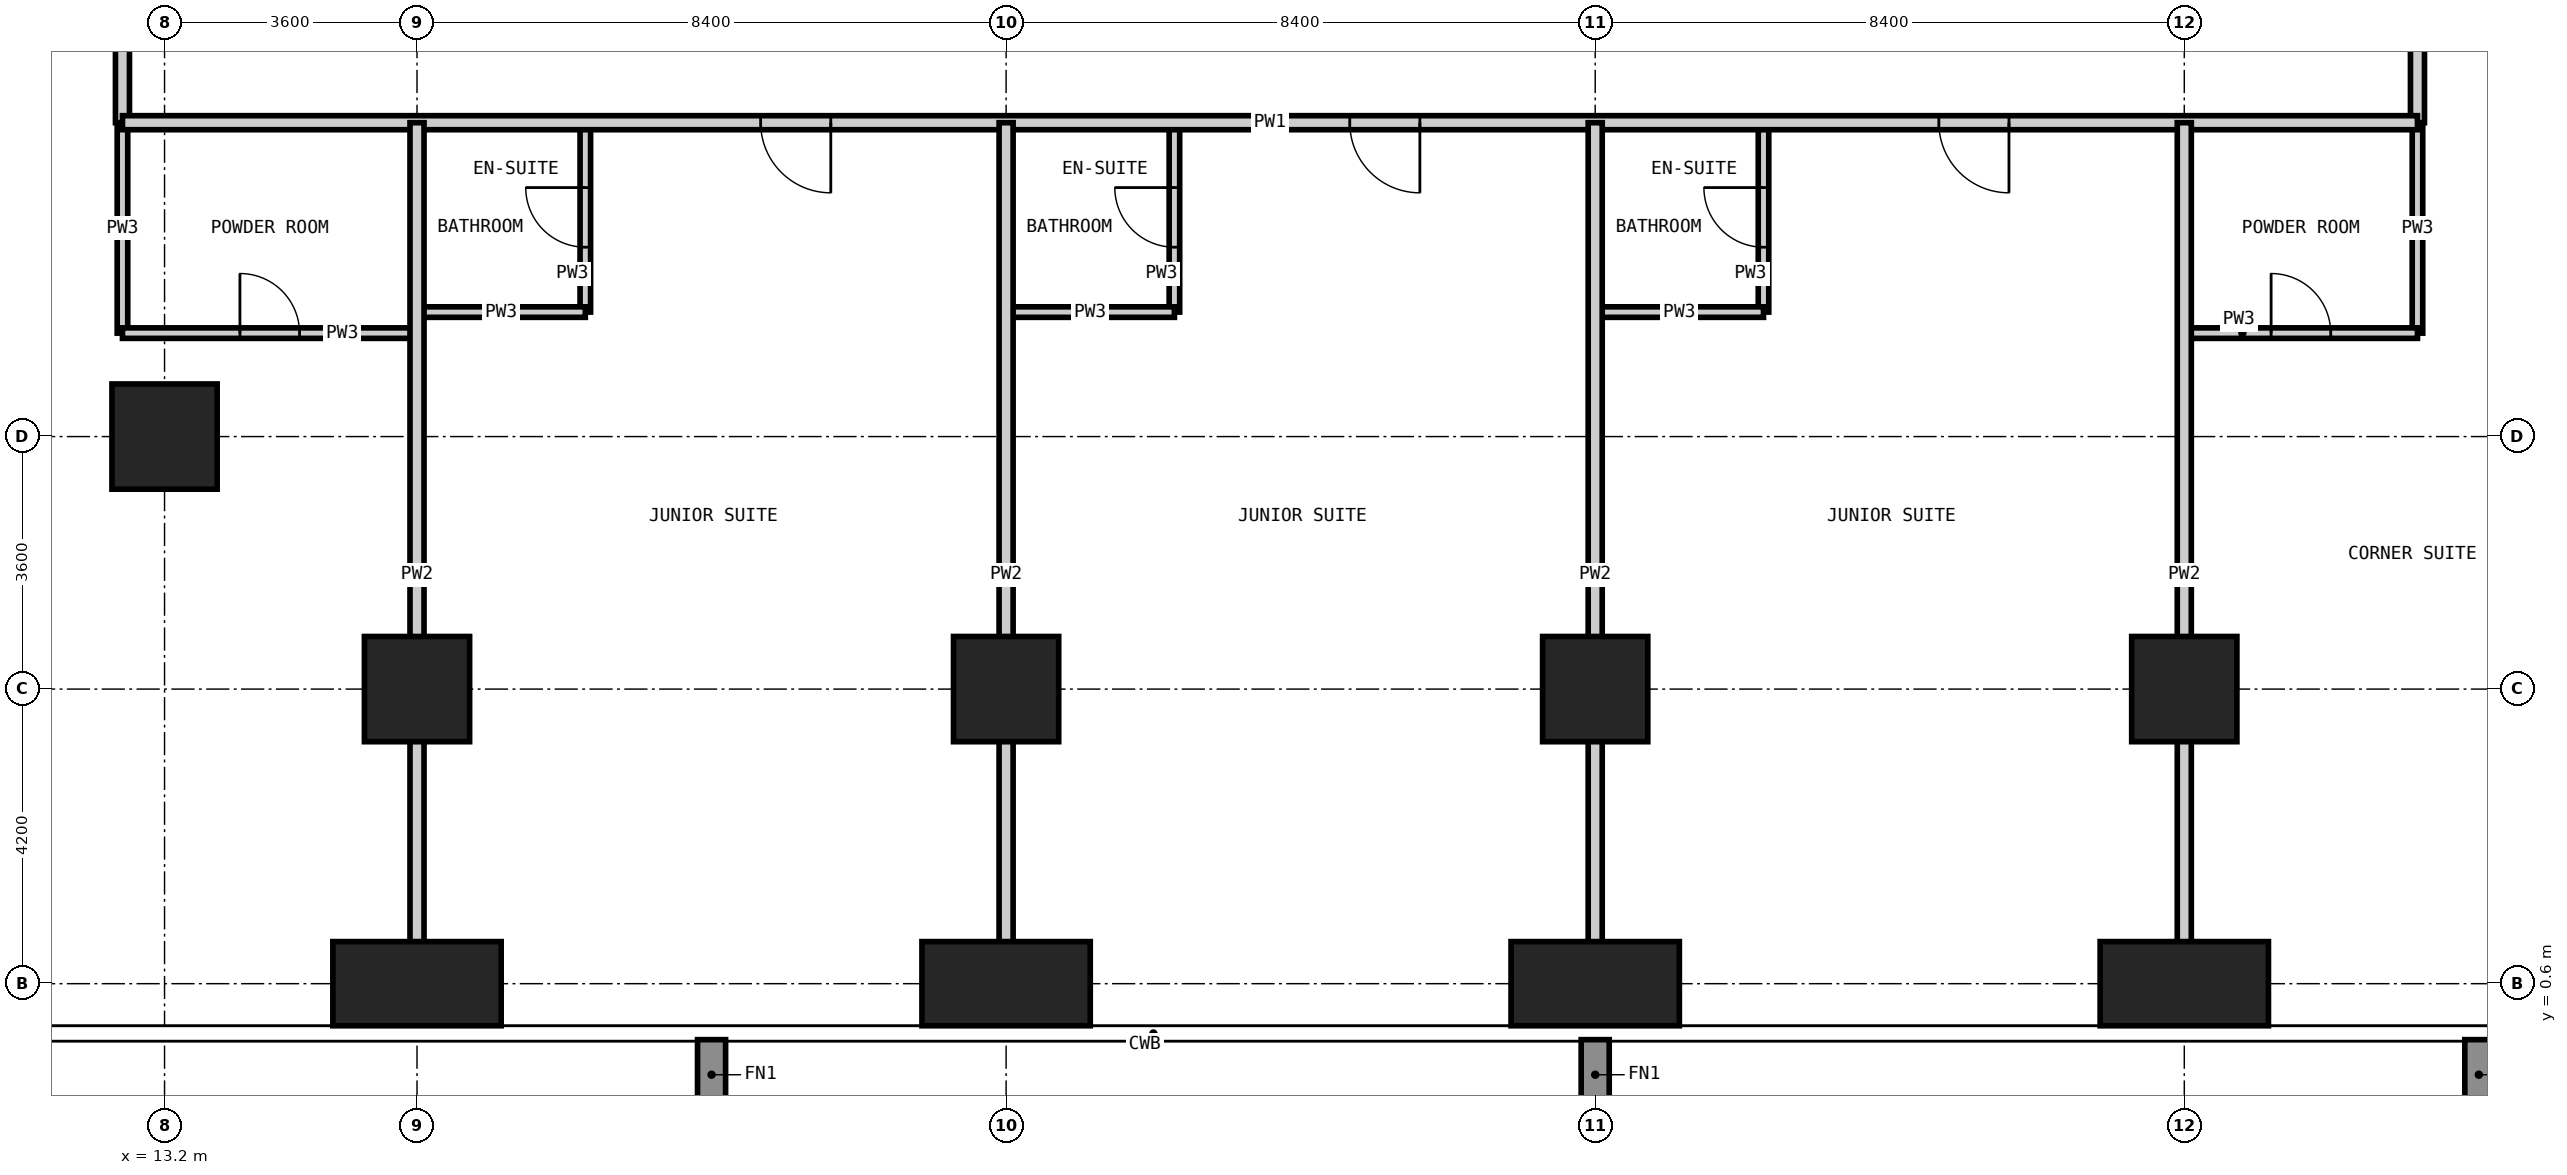
"""IFC4 building model, lengths in metres.
Left out: names, types, materials, properties, quantities, classifications, styles, units other than length and angle.
Written with IfcOpenShell. Run it as: python <this file> out.ifc"""

import sys

from ifc_helpers import new_model, si_unit, direction, frame, frame_2d, origin, origin_2d, place, context, subcontext, project, spatial, rectangle, extrude, element, fill, save


model = new_model("IFC4")
c1 = context("Model", 3, precision=1e-05, world=origin(), true_north=direction((0.0, 1.0)))
c2 = subcontext(c1, "Body", "Model", "MODEL_VIEW")
j1 = project(units=[si_unit("LENGTHUNIT", "METRE"), si_unit("PLANEANGLEUNIT", "RADIAN")], contexts=[c1])
p1 = place(None, origin())
s1 = spatial("IfcSite", under=j1, at=p1, CompositionType="ELEMENT")
p2 = place(p1, origin())
s2 = spatial("IfcBuilding", under=s1, at=p2, CompositionType="ELEMENT")
p3 = place(p2, frame((0.0, 0.0, 111.6)))
s3 = spatial("IfcBuildingStorey", under=s2, at=p3, CompositionType="ELEMENT", Elevation=111.6)
p4 = place(p3, frame((13.2, 8.4, -0.35), z_axis=(0.0, 0.0, 1.0), x_axis=(1.0, 0.0, 0.0)))
e1 = element("IfcColumn", 1, at=p4, inside=s3, PredefinedType="COLUMN", context=c2, shape_type="SweptSolid", body=[
    extrude(rectangle(XDim=1.5, YDim=1.5, at=origin_2d()), origin(), (0.0, 0.0, 1.0), 3.6),
])
p5 = place(p3, frame((16.8, 0.6, -0.35), z_axis=(0.0, 0.0, 1.0), x_axis=(1.0, 0.0, 0.0)))
e2 = element("IfcColumn", 2, at=p5, inside=s3, PredefinedType="COLUMN", context=c2, shape_type="SweptSolid", body=[
    extrude(rectangle(XDim=2.4, YDim=1.2, at=origin_2d()), origin(), (0.0, 0.0, 1.0), 3.6),
])
p6 = place(p3, frame((16.8, 4.8, -0.35), z_axis=(0.0, 0.0, 1.0), x_axis=(1.0, 0.0, 0.0)))
e3 = element("IfcColumn", 3, at=p6, inside=s3, PredefinedType="COLUMN", context=c2, shape_type="SweptSolid", body=[
    extrude(rectangle(XDim=1.5, YDim=1.5, at=origin_2d()), origin(), (0.0, 0.0, 1.0), 3.6),
])
p7 = place(p3, frame((25.2, 0.6, -0.35), z_axis=(0.0, 0.0, 1.0), x_axis=(1.0, 0.0, 0.0)))
e4 = element("IfcColumn", 4, at=p7, inside=s3, PredefinedType="COLUMN", context=c2, shape_type="SweptSolid", body=[
    extrude(rectangle(XDim=2.4, YDim=1.2, at=origin_2d()), origin(), (0.0, 0.0, 1.0), 3.6),
])
p8 = place(p3, frame((25.2, 4.8, -0.35), z_axis=(0.0, 0.0, 1.0), x_axis=(1.0, 0.0, 0.0)))
e5 = element("IfcColumn", 5, at=p8, inside=s3, PredefinedType="COLUMN", context=c2, shape_type="SweptSolid", body=[
    extrude(rectangle(XDim=1.5, YDim=1.5, at=origin_2d()), origin(), (0.0, 0.0, 1.0), 3.6),
])
p9 = place(p3, frame((33.6, 0.6, -0.35), z_axis=(0.0, 0.0, 1.0), x_axis=(1.0, 0.0, 0.0)))
e6 = element("IfcColumn", 6, at=p9, inside=s3, PredefinedType="COLUMN", context=c2, shape_type="SweptSolid", body=[
    extrude(rectangle(XDim=2.4, YDim=1.2, at=origin_2d()), origin(), (0.0, 0.0, 1.0), 3.6),
])
p10 = place(p3, frame((33.6, 4.8, -0.35), z_axis=(0.0, 0.0, 1.0), x_axis=(1.0, 0.0, 0.0)))
e7 = element("IfcColumn", 7, at=p10, inside=s3, PredefinedType="COLUMN", context=c2, shape_type="SweptSolid", body=[
    extrude(rectangle(XDim=1.5, YDim=1.5, at=origin_2d()), origin(), (0.0, 0.0, 1.0), 3.6),
])
p11 = place(p3, frame((42.0, 0.6, -0.35), z_axis=(0.0, 0.0, 1.0), x_axis=(1.0, 0.0, 0.0)))
e8 = element("IfcColumn", 8, at=p11, inside=s3, PredefinedType="COLUMN", context=c2, shape_type="SweptSolid", body=[
    extrude(rectangle(XDim=2.4, YDim=1.2, at=origin_2d()), origin(), (0.0, 0.0, 1.0), 3.6),
])
p12 = place(p3, frame((42.0, 4.8, -0.35), z_axis=(0.0, 0.0, 1.0), x_axis=(1.0, 0.0, 0.0)))
e9 = element("IfcColumn", 9, at=p12, inside=s3, PredefinedType="COLUMN", context=c2, shape_type="SweptSolid", body=[
    extrude(rectangle(XDim=1.5, YDim=1.5, at=origin_2d()), origin(), (0.0, 0.0, 1.0), 3.6),
])
p13 = place(p3, frame((12.6, 9.875, 0.0), z_axis=(0.0, 0.0, 1.0), x_axis=(0.0, 1.0, 0.0)))
e10 = element("IfcWall", 10, at=p13, inside=s3, PredefinedType="PARTITIONING", context=c2, shape_type="SweptSolid", body=[
    extrude(rectangle(XDim=3.0, YDim=0.15, at=frame_2d((1.5, 0.0))), origin(), (0.0, 0.0, 1.0), 3.25),
])
p14 = place(p3, frame((19.2, 10.175, 0.0), z_axis=(0.0, 0.0, 1.0), x_axis=(0.0, 1.0, 0.0)))
e11 = element("IfcWall", 11, at=p14, inside=s3, PredefinedType="PARTITIONING", context=c2, shape_type="SweptSolid", body=[
    extrude(rectangle(XDim=2.7, YDim=0.15, at=frame_2d((1.35, 0.0))), origin(), (0.0, 0.0, 1.0), 3.25),
])
p15 = place(p14, frame((0.925, 0.0, 0.0)))
e12 = element("IfcOpeningElement", 12, at=p15, cuts=e11, PredefinedType="OPENING", context=c2, shape_type="SweptSolid", body=[
    extrude(rectangle(XDim=0.85, YDim=2.1, at=frame_2d((0.425, 1.05))), frame((0.0, 0.085, 0.0), z_axis=(0.0, -1.0, 0.0), x_axis=(1.0, 0.0, 0.0)), (0.0, 0.0, 1.0), 0.17),
])
p16 = place(p3, frame((27.6, 10.175, 0.0), z_axis=(0.0, 0.0, 1.0), x_axis=(0.0, 1.0, 0.0)))
e13 = element("IfcWall", 13, at=p16, inside=s3, PredefinedType="PARTITIONING", context=c2, shape_type="SweptSolid", body=[
    extrude(rectangle(XDim=2.7, YDim=0.15, at=frame_2d((1.35, 0.0))), origin(), (0.0, 0.0, 1.0), 3.25),
])
p17 = place(p16, frame((0.925, 0.0, 0.0)))
e14 = element("IfcOpeningElement", 14, at=p17, cuts=e13, PredefinedType="OPENING", context=c2, shape_type="SweptSolid", body=[
    extrude(rectangle(XDim=0.85, YDim=2.1, at=frame_2d((0.425, 1.05))), frame((0.0, 0.085, 0.0), z_axis=(0.0, -1.0, 0.0), x_axis=(1.0, 0.0, 0.0)), (0.0, 0.0, 1.0), 0.17),
])
p18 = place(p3, frame((36.0, 10.175, 0.0), z_axis=(0.0, 0.0, 1.0), x_axis=(0.0, 1.0, 0.0)))
e15 = element("IfcWall", 15, at=p18, inside=s3, PredefinedType="PARTITIONING", context=c2, shape_type="SweptSolid", body=[
    extrude(rectangle(XDim=2.7, YDim=0.15, at=frame_2d((1.35, 0.0))), origin(), (0.0, 0.0, 1.0), 3.25),
])
p19 = place(p18, frame((0.925, 0.0, 0.0)))
e16 = element("IfcOpeningElement", 16, at=p19, cuts=e15, PredefinedType="OPENING", context=c2, shape_type="SweptSolid", body=[
    extrude(rectangle(XDim=0.85, YDim=2.1, at=frame_2d((0.425, 1.05))), frame((0.0, 0.085, 0.0), z_axis=(0.0, -1.0, 0.0), x_axis=(1.0, 0.0, 0.0)), (0.0, 0.0, 1.0), 0.17),
])
p20 = place(p3, frame((45.325, 9.875, 0.0), z_axis=(0.0, 0.0, 1.0), x_axis=(0.0, 1.0, 0.0)))
e17 = element("IfcWall", 17, at=p20, inside=s3, PredefinedType="PARTITIONING", context=c2, shape_type="SweptSolid", body=[
    extrude(rectangle(XDim=3.0, YDim=0.15, at=frame_2d((1.5, 0.0))), origin(), (0.0, 0.0, 1.0), 3.25),
])
p21 = place(p3, frame((12.6, 9.875, 0.0), z_axis=(0.0, 0.0, 1.0), x_axis=(1.0, 0.0, 0.0)))
e18 = element("IfcWall", 18, at=p21, inside=s3, PredefinedType="PARTITIONING", context=c2, shape_type="SweptSolid", body=[
    extrude(rectangle(XDim=4.2, YDim=0.15, at=frame_2d((2.1, 0.0))), origin(), (0.0, 0.0, 1.0), 3.25),
])
p22 = place(p21, frame((1.675, 0.0, 0.0)))
e19 = element("IfcOpeningElement", 19, at=p22, cuts=e18, PredefinedType="OPENING", context=c2, shape_type="SweptSolid", body=[
    extrude(rectangle(XDim=0.85, YDim=2.1, at=frame_2d((0.425, 1.05))), frame((0.0, 0.085, 0.0), z_axis=(0.0, -1.0, 0.0), x_axis=(1.0, 0.0, 0.0)), (0.0, 0.0, 1.0), 0.17),
])
p23 = place(p3, frame((42.0, 9.875, 0.0), z_axis=(0.0, 0.0, 1.0), x_axis=(1.0, 0.0, 0.0)))
e20 = element("IfcWall", 20, at=p23, inside=s3, PredefinedType="PARTITIONING", context=c2, shape_type="SweptSolid", body=[
    extrude(rectangle(XDim=3.325, YDim=0.15, at=frame_2d((1.663, 0.0))), origin(), (0.0, 0.0, 1.0), 3.25),
])
p24 = place(p23, frame((1.238, 0.0, 0.0)))
e21 = element("IfcOpeningElement", 21, at=p24, cuts=e20, PredefinedType="OPENING", context=c2, shape_type="SweptSolid", body=[
    extrude(rectangle(XDim=0.85, YDim=2.1, at=frame_2d((0.425, 1.05))), frame((0.0, 0.085, 0.0), z_axis=(0.0, -1.0, 0.0), x_axis=(1.0, 0.0, 0.0)), (0.0, 0.0, 1.0), 0.17),
])
p25 = place(p3, frame((16.8, 10.175, 0.0), z_axis=(0.0, 0.0, 1.0), x_axis=(1.0, 0.0, 0.0)))
e22 = element("IfcWall", 22, at=p25, inside=s3, PredefinedType="PARTITIONING", context=c2, shape_type="SweptSolid", body=[
    extrude(rectangle(XDim=2.4, YDim=0.15, at=frame_2d((1.2, 0.0))), origin(), (0.0, 0.0, 1.0), 3.25),
])
p26 = place(p3, frame((25.2, 10.175, 0.0), z_axis=(0.0, 0.0, 1.0), x_axis=(1.0, 0.0, 0.0)))
e23 = element("IfcWall", 23, at=p26, inside=s3, PredefinedType="PARTITIONING", context=c2, shape_type="SweptSolid", body=[
    extrude(rectangle(XDim=2.4, YDim=0.15, at=frame_2d((1.2, 0.0))), origin(), (0.0, 0.0, 1.0), 3.25),
])
p27 = place(p3, frame((33.6, 10.175, 0.0), z_axis=(0.0, 0.0, 1.0), x_axis=(1.0, 0.0, 0.0)))
e24 = element("IfcWall", 24, at=p27, inside=s3, PredefinedType="PARTITIONING", context=c2, shape_type="SweptSolid", body=[
    extrude(rectangle(XDim=2.4, YDim=0.15, at=frame_2d((1.2, 0.0))), origin(), (0.0, 0.0, 1.0), 3.25),
])
p28 = place(p3, frame((12.6, 12.875, 0.0), z_axis=(0.0, 0.0, 1.0), x_axis=(0.0, 1.0, 0.0)))
e25 = element("IfcWall", 25, at=p28, inside=s3, PredefinedType="PARTITIONING", context=c2, shape_type="SweptSolid", body=[
    extrude(rectangle(XDim=31.85, YDim=0.2, at=frame_2d((15.925, 0.0))), origin(), (0.0, 0.0, 1.0), 3.25),
])
p29 = place(p28, frame((8.825, 0.0, 0.0)))
e26 = element("IfcOpeningElement", 26, at=p29, cuts=e25, PredefinedType="OPENING", context=c2, shape_type="SweptSolid", body=[
    extrude(rectangle(XDim=1.0, YDim=2.2, at=frame_2d((0.5, 1.1))), frame((0.0, 0.11, 0.0), z_axis=(0.0, -1.0, 0.0), x_axis=(1.0, 0.0, 0.0)), (0.0, 0.0, 1.0), 0.22),
])
p30 = place(p28, frame((17.225, 0.0, 0.0)))
e27 = element("IfcOpeningElement", 27, at=p30, cuts=e25, PredefinedType="OPENING", context=c2, shape_type="SweptSolid", body=[
    extrude(rectangle(XDim=1.0, YDim=2.2, at=frame_2d((0.5, 1.1))), frame((0.0, 0.11, 0.0), z_axis=(0.0, -1.0, 0.0), x_axis=(1.0, 0.0, 0.0)), (0.0, 0.0, 1.0), 0.22),
])
p31 = place(p28, frame((25.625, 0.0, 0.0)))
e28 = element("IfcOpeningElement", 28, at=p31, cuts=e25, PredefinedType="OPENING", context=c2, shape_type="SweptSolid", body=[
    extrude(rectangle(XDim=1.0, YDim=2.2, at=frame_2d((0.5, 1.1))), frame((0.0, 0.11, 0.0), z_axis=(0.0, -1.0, 0.0), x_axis=(1.0, 0.0, 0.0)), (0.0, 0.0, 1.0), 0.22),
])
p32 = place(p28, frame((1.463, 0.0, 0.0)))
e29 = element("IfcOpeningElement", 29, at=p32, cuts=e25, PredefinedType="OPENING", context=c2, shape_type="SweptSolid", body=[
    extrude(rectangle(XDim=1.0, YDim=2.2, at=frame_2d((0.5, 1.1))), frame((0.0, 0.11, 0.0), z_axis=(0.0, -1.0, 0.0), x_axis=(1.0, 0.0, 0.0)), (0.0, 0.0, 1.0), 0.22),
])
p33 = place(p28, frame((29.987, 0.0, 0.0)))
e30 = element("IfcOpeningElement", 30, at=p33, cuts=e25, PredefinedType="OPENING", context=c2, shape_type="SweptSolid", body=[
    extrude(rectangle(XDim=1.0, YDim=2.2, at=frame_2d((0.5, 1.1))), frame((0.0, 0.11, 0.0), z_axis=(0.0, -1.0, 0.0), x_axis=(1.0, 0.0, 0.0)), (0.0, 0.0, 1.0), 0.22),
])
p34 = place(p3, frame((45.325, 44.725, 0.0), z_axis=(0.0, 0.0, 1.0), x_axis=(0.0, -1.0, 0.0)))
e31 = element("IfcWall", 31, at=p34, inside=s3, PredefinedType="PARTITIONING", context=c2, shape_type="SweptSolid", body=[
    extrude(rectangle(XDim=31.85, YDim=0.2, at=frame_2d((15.925, 0.0))), origin(), (0.0, 0.0, 1.0), 3.25),
])
p35 = place(p34, frame((24.425, 0.0, 0.0)))
e32 = element("IfcOpeningElement", 32, at=p35, cuts=e31, PredefinedType="OPENING", context=c2, shape_type="SweptSolid", body=[
    extrude(rectangle(XDim=1.0, YDim=2.2, at=frame_2d((0.5, 1.1))), frame((0.0, 0.11, 0.0), z_axis=(0.0, -1.0, 0.0), x_axis=(1.0, 0.0, 0.0)), (0.0, 0.0, 1.0), 0.22),
])
p36 = place(p34, frame((16.025, 0.0, 0.0)))
e33 = element("IfcOpeningElement", 33, at=p36, cuts=e31, PredefinedType="OPENING", context=c2, shape_type="SweptSolid", body=[
    extrude(rectangle(XDim=1.0, YDim=2.2, at=frame_2d((0.5, 1.1))), frame((0.0, 0.11, 0.0), z_axis=(0.0, -1.0, 0.0), x_axis=(1.0, 0.0, 0.0)), (0.0, 0.0, 1.0), 0.22),
])
p37 = place(p34, frame((7.625, 0.0, 0.0)))
e34 = element("IfcOpeningElement", 34, at=p37, cuts=e31, PredefinedType="OPENING", context=c2, shape_type="SweptSolid", body=[
    extrude(rectangle(XDim=1.0, YDim=2.2, at=frame_2d((0.5, 1.1))), frame((0.0, 0.11, 0.0), z_axis=(0.0, -1.0, 0.0), x_axis=(1.0, 0.0, 0.0)), (0.0, 0.0, 1.0), 0.22),
])
p38 = place(p34, frame((29.387, 0.0, 0.0)))
e35 = element("IfcOpeningElement", 35, at=p38, cuts=e31, PredefinedType="OPENING", context=c2, shape_type="SweptSolid", body=[
    extrude(rectangle(XDim=1.0, YDim=2.2, at=frame_2d((0.5, 1.1))), frame((0.0, 0.11, 0.0), z_axis=(0.0, -1.0, 0.0), x_axis=(1.0, 0.0, 0.0)), (0.0, 0.0, 1.0), 0.22),
])
p39 = place(p34, frame((0.863, 0.0, 0.0)))
e36 = element("IfcOpeningElement", 36, at=p39, cuts=e31, PredefinedType="OPENING", context=c2, shape_type="SweptSolid", body=[
    extrude(rectangle(XDim=1.0, YDim=2.2, at=frame_2d((0.5, 1.1))), frame((0.0, 0.11, 0.0), z_axis=(0.0, -1.0, 0.0), x_axis=(1.0, 0.0, 0.0)), (0.0, 0.0, 1.0), 0.22),
])
p40 = place(p3, frame((45.325, 12.875, 0.0), z_axis=(0.0, 0.0, 1.0), x_axis=(-1.0, 0.0, 0.0)))
e37 = element("IfcWall", 37, at=p40, inside=s3, PredefinedType="PARTITIONING", context=c2, shape_type="SweptSolid", body=[
    extrude(rectangle(XDim=32.725, YDim=0.2, at=frame_2d((16.362, 0.0))), origin(), (0.0, 0.0, 1.0), 3.25),
])
p41 = place(p40, frame((22.625, 0.0, 0.0)))
e38 = element("IfcOpeningElement", 38, at=p41, cuts=e37, PredefinedType="OPENING", context=c2, shape_type="SweptSolid", body=[
    extrude(rectangle(XDim=1.0, YDim=2.2, at=frame_2d((0.5, 1.1))), frame((0.0, 0.11, 0.0), z_axis=(0.0, -1.0, 0.0), x_axis=(1.0, 0.0, 0.0)), (0.0, 0.0, 1.0), 0.22),
])
p42 = place(p40, frame((14.225, 0.0, 0.0)))
e39 = element("IfcOpeningElement", 39, at=p42, cuts=e37, PredefinedType="OPENING", context=c2, shape_type="SweptSolid", body=[
    extrude(rectangle(XDim=1.0, YDim=2.2, at=frame_2d((0.5, 1.1))), frame((0.0, 0.11, 0.0), z_axis=(0.0, -1.0, 0.0), x_axis=(1.0, 0.0, 0.0)), (0.0, 0.0, 1.0), 0.22),
])
p43 = place(p40, frame((5.825, 0.0, 0.0)))
e40 = element("IfcOpeningElement", 40, at=p43, cuts=e37, PredefinedType="OPENING", context=c2, shape_type="SweptSolid", body=[
    extrude(rectangle(XDim=1.0, YDim=2.2, at=frame_2d((0.5, 1.1))), frame((0.0, 0.11, 0.0), z_axis=(0.0, -1.0, 0.0), x_axis=(1.0, 0.0, 0.0)), (0.0, 0.0, 1.0), 0.22),
])
for number, where, z_axis, x_axis in (
    (41, (16.8, -0.018, 0.0), (0.0, 0.0, 1.0), (0.0, 1.0, 0.0)),
    (42, (25.2, -0.018, 0.0), (0.0, 0.0, 1.0), (0.0, 1.0, 0.0)),
    (43, (33.6, -0.018, 0.0), (0.0, 0.0, 1.0), (0.0, 1.0, 0.0)),
    (44, (42.0, -0.018, 0.0), (0.0, 0.0, 1.0), (0.0, 1.0, 0.0)),
):
    element("IfcWall", number, at=place(p3, frame(where, z_axis=z_axis, x_axis=x_axis)), inside=s3, PredefinedType="PARTITIONING", context=c2, shape_type="SweptSolid", body=[
        extrude(rectangle(XDim=12.893, YDim=0.2, at=frame_2d((6.447, 0.0))), origin(), (0.0, 0.0, 1.0), 3.25),
    ])
p44 = place(p41, origin())
e45 = element("IfcDoor", 45, at=p44, inside=s3, OperationType="SINGLE_SWING_LEFT", PredefinedType="DOOR", context=c2, shape_type="SweptSolid", body=[
    extrude(rectangle(XDim=1.0, YDim=2.2, at=frame_2d((0.5, 1.1))), frame((0.0, 0.025, 0.0), z_axis=(0.0, -1.0, 0.0), x_axis=(1.0, 0.0, 0.0)), (0.0, 0.0, 1.0), 0.05),
])
fill(e38, e45)
p45 = place(p15, origin())
e46 = element("IfcDoor", 46, at=p45, inside=s3, OperationType="SINGLE_SWING_RIGHT", PredefinedType="DOOR", context=c2, shape_type="SweptSolid", body=[
    extrude(rectangle(XDim=0.85, YDim=2.1, at=frame_2d((0.425, 1.05))), frame((0.0, 0.025, 0.0), z_axis=(0.0, -1.0, 0.0), x_axis=(1.0, 0.0, 0.0)), (0.0, 0.0, 1.0), 0.05),
])
fill(e12, e46)
p46 = place(p42, origin())
e47 = element("IfcDoor", 47, at=p46, inside=s3, OperationType="SINGLE_SWING_LEFT", PredefinedType="DOOR", context=c2, shape_type="SweptSolid", body=[
    extrude(rectangle(XDim=1.0, YDim=2.2, at=frame_2d((0.5, 1.1))), frame((0.0, 0.025, 0.0), z_axis=(0.0, -1.0, 0.0), x_axis=(1.0, 0.0, 0.0)), (0.0, 0.0, 1.0), 0.05),
])
fill(e39, e47)
p47 = place(p17, origin())
e48 = element("IfcDoor", 48, at=p47, inside=s3, OperationType="SINGLE_SWING_RIGHT", PredefinedType="DOOR", context=c2, shape_type="SweptSolid", body=[
    extrude(rectangle(XDim=0.85, YDim=2.1, at=frame_2d((0.425, 1.05))), frame((0.0, 0.025, 0.0), z_axis=(0.0, -1.0, 0.0), x_axis=(1.0, 0.0, 0.0)), (0.0, 0.0, 1.0), 0.05),
])
fill(e14, e48)
p48 = place(p43, origin())
e49 = element("IfcDoor", 49, at=p48, inside=s3, OperationType="SINGLE_SWING_LEFT", PredefinedType="DOOR", context=c2, shape_type="SweptSolid", body=[
    extrude(rectangle(XDim=1.0, YDim=2.2, at=frame_2d((0.5, 1.1))), frame((0.0, 0.025, 0.0), z_axis=(0.0, -1.0, 0.0), x_axis=(1.0, 0.0, 0.0)), (0.0, 0.0, 1.0), 0.05),
])
fill(e40, e49)
p49 = place(p19, origin())
e50 = element("IfcDoor", 50, at=p49, inside=s3, OperationType="SINGLE_SWING_RIGHT", PredefinedType="DOOR", context=c2, shape_type="SweptSolid", body=[
    extrude(rectangle(XDim=0.85, YDim=2.1, at=frame_2d((0.425, 1.05))), frame((0.0, 0.025, 0.0), z_axis=(0.0, -1.0, 0.0), x_axis=(1.0, 0.0, 0.0)), (0.0, 0.0, 1.0), 0.05),
])
fill(e16, e50)
p50 = place(p22, origin())
e51 = element("IfcDoor", 51, at=p50, inside=s3, OperationType="SINGLE_SWING_LEFT", PredefinedType="DOOR", context=c2, shape_type="SweptSolid", body=[
    extrude(rectangle(XDim=0.85, YDim=2.1, at=frame_2d((0.425, 1.05))), frame((0.0, 0.025, 0.0), z_axis=(0.0, -1.0, 0.0), x_axis=(1.0, 0.0, 0.0)), (0.0, 0.0, 1.0), 0.05),
])
fill(e19, e51)
p51 = place(p24, origin())
e52 = element("IfcDoor", 52, at=p51, inside=s3, OperationType="SINGLE_SWING_LEFT", PredefinedType="DOOR", context=c2, shape_type="SweptSolid", body=[
    extrude(rectangle(XDim=0.85, YDim=2.1, at=frame_2d((0.425, 1.05))), frame((0.0, 0.025, 0.0), z_axis=(0.0, -1.0, 0.0), x_axis=(1.0, 0.0, 0.0)), (0.0, 0.0, 1.0), 0.05),
])
fill(e21, e52)
save(model, sys.argv[1])
